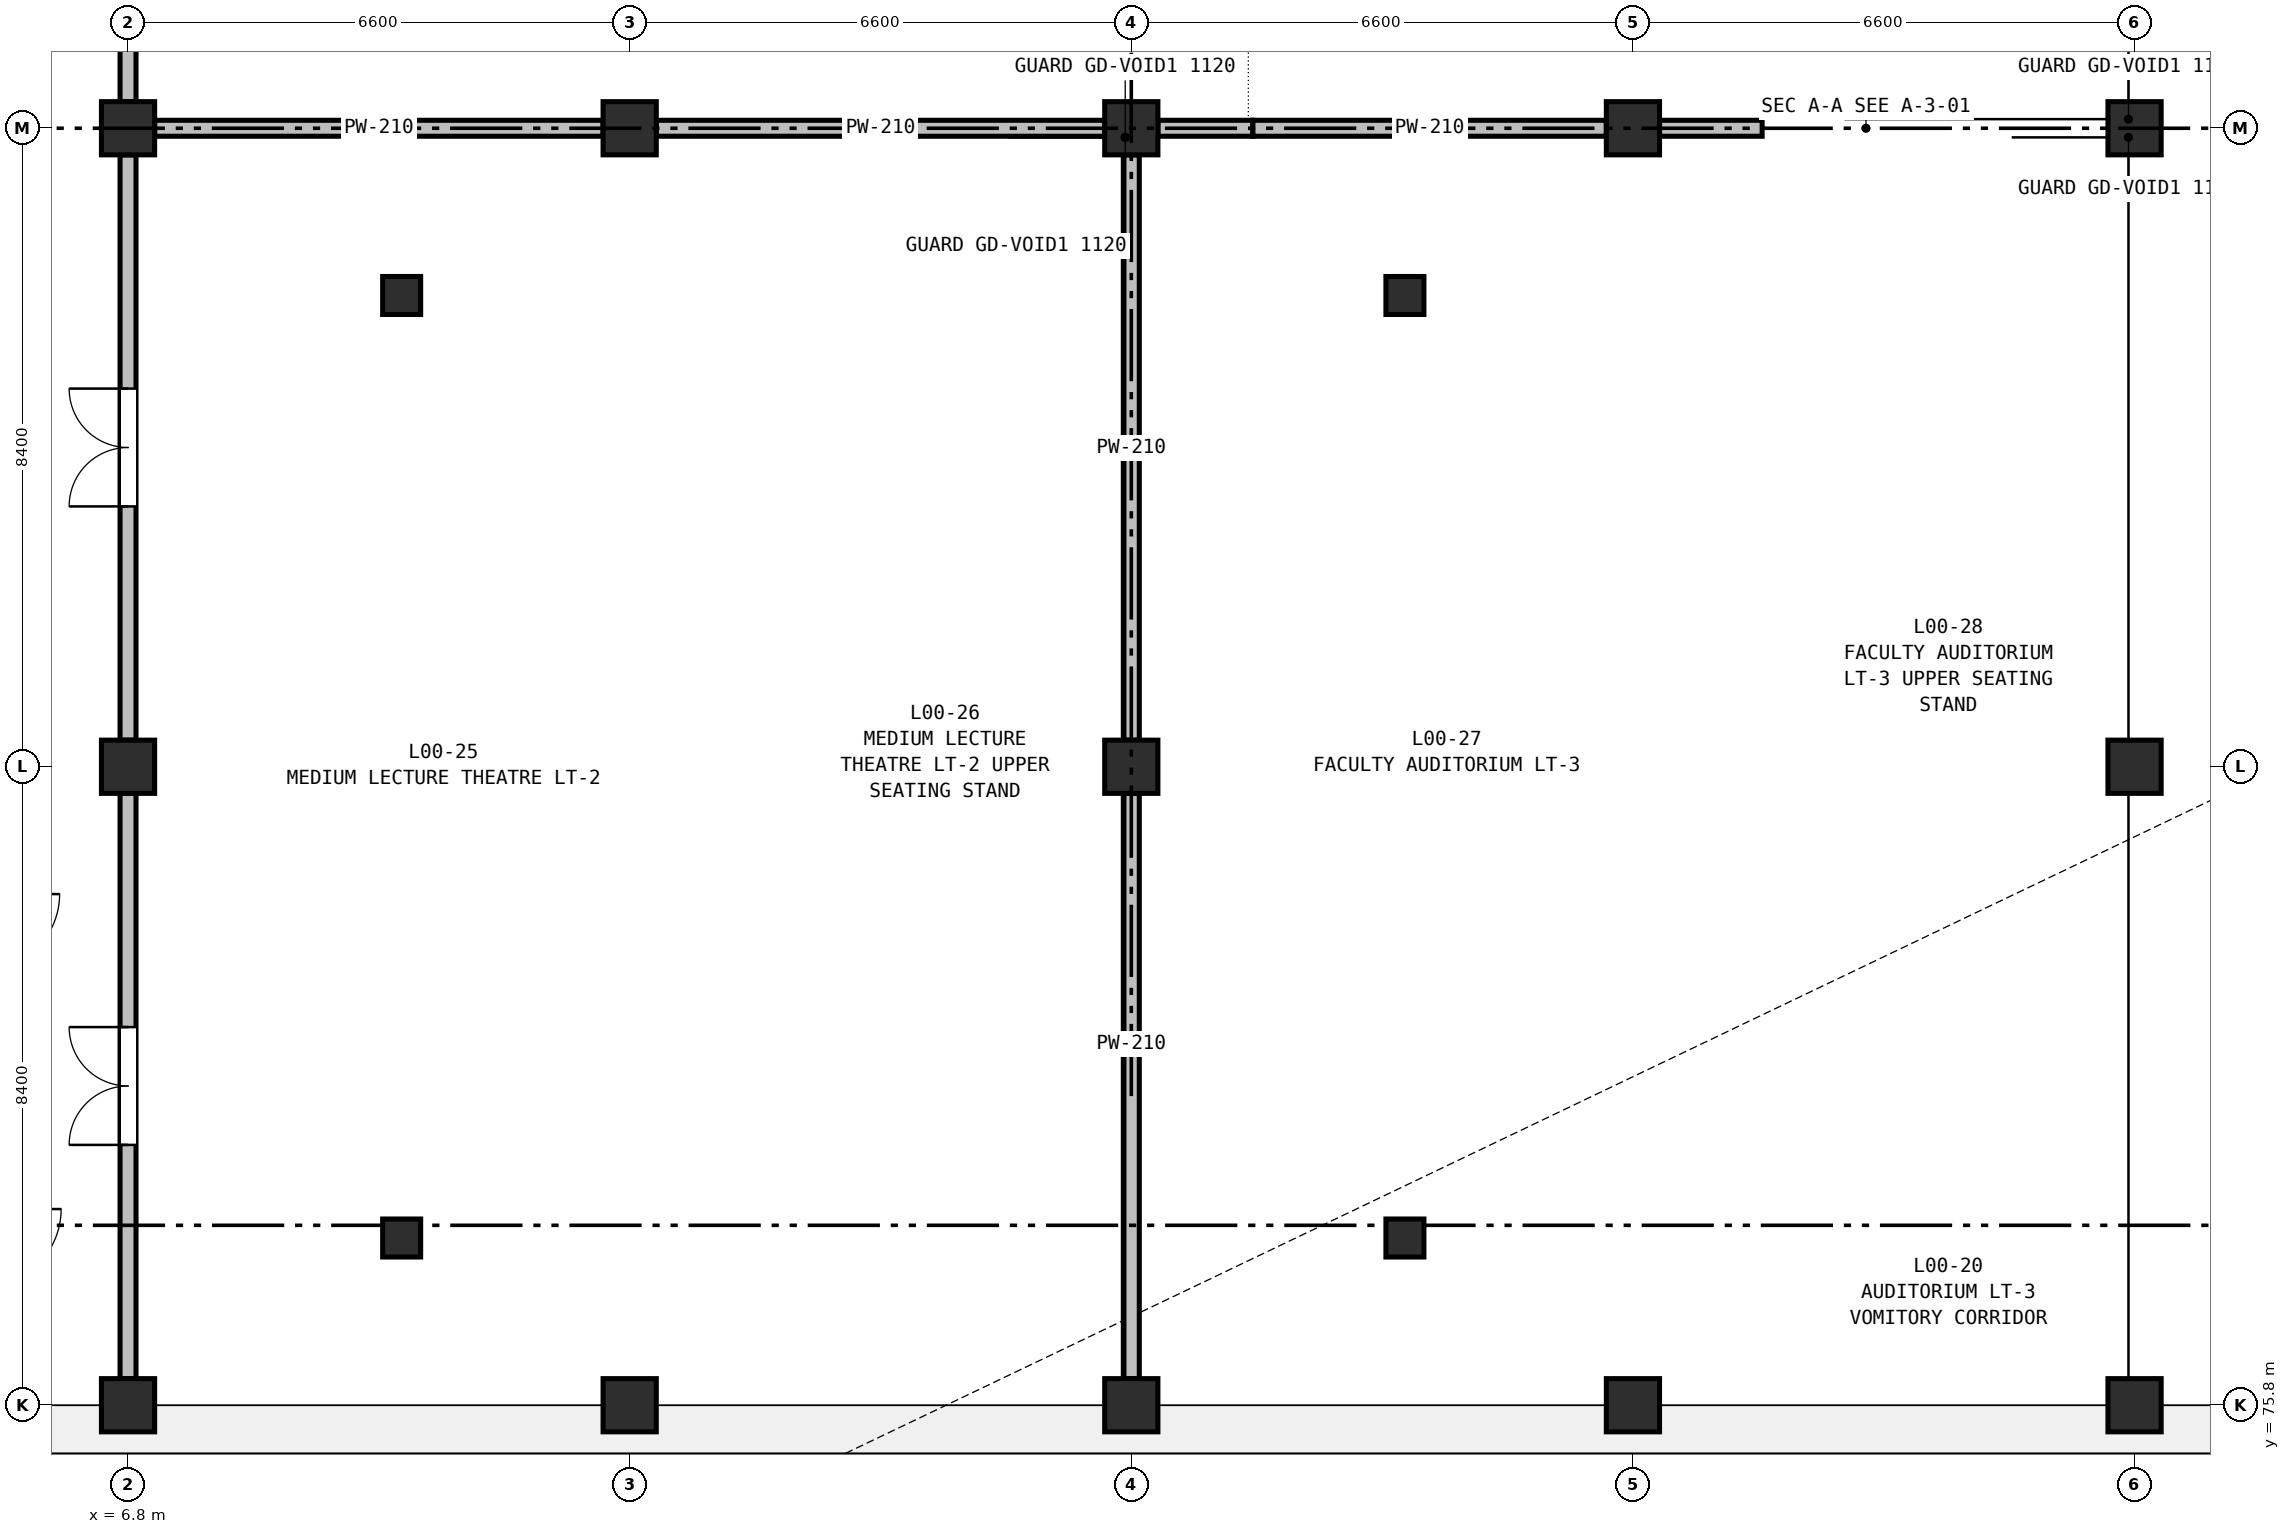
"""IFC4 building model, lengths in metres.
Left out: names, types, materials, properties, quantities, classifications, styles, units other than length and angle.
Written with IfcOpenShell. Run it as: python <this file> out.ifc"""

import sys

from ifc_helpers import new_model, si_unit, direction, frame, frame_2d, origin, origin_2d, place, context, subcontext, project, spatial, rectangle, extrude, element, fill, save


model = new_model("IFC4")
c1 = context("Model", 3, precision=1e-05, world=origin(), true_north=direction((0.0, 1.0)))
c2 = subcontext(c1, "Body", "Model", "MODEL_VIEW")
j1 = project(units=[si_unit("LENGTHUNIT", "METRE"), si_unit("PLANEANGLEUNIT", "RADIAN")], contexts=[c1])
p1 = place(None, origin())
s1 = spatial("IfcSite", under=j1, at=p1, CompositionType="ELEMENT")
p2 = place(p1, origin())
s2 = spatial("IfcBuilding", under=s1, at=p2, CompositionType="ELEMENT")
p3 = place(p2, origin())
s3 = spatial("IfcBuildingStorey", under=s2, at=p3, CompositionType="ELEMENT", Elevation=0.0)
for number, where, z_axis, x_axis in (
    (1, (6.8, 75.8, -0.32), (0.0, 0.0, 1.0), (1.0, 0.0, 0.0)),
    (2, (6.8, 84.2, -0.32), (0.0, 0.0, 1.0), (1.0, 0.0, 0.0)),
    (3, (6.8, 92.6, -0.32), (0.0, 0.0, 1.0), (1.0, 0.0, 0.0)),
    (4, (13.4, 75.8, -0.32), (0.0, 0.0, 1.0), (1.0, 0.0, 0.0)),
    (5, (13.4, 92.6, -0.32), (0.0, 0.0, 1.0), (1.0, 0.0, 0.0)),
    (6, (20.0, 75.8, -0.32), (0.0, 0.0, 1.0), (1.0, 0.0, 0.0)),
    (7, (20.0, 84.2, -0.32), (0.0, 0.0, 1.0), (1.0, 0.0, 0.0)),
    (8, (20.0, 92.6, -0.32), (0.0, 0.0, 1.0), (1.0, 0.0, 0.0)),
    (9, (26.6, 75.8, -0.32), (0.0, 0.0, 1.0), (1.0, 0.0, 0.0)),
    (10, (26.6, 92.6, -0.32), (0.0, 0.0, 1.0), (1.0, 0.0, 0.0)),
    (11, (33.2, 75.8, -0.32), (0.0, 0.0, 1.0), (1.0, 0.0, 0.0)),
    (12, (33.2, 84.2, -0.32), (0.0, 0.0, 1.0), (1.0, 0.0, 0.0)),
    (13, (33.2, 92.6, -0.32), (0.0, 0.0, 1.0), (1.0, 0.0, 0.0)),
):
    element("IfcColumn", number, at=place(p3, frame(where, z_axis=z_axis, x_axis=x_axis)), inside=s3, PredefinedType="COLUMN", context=c2, shape_type="SweptSolid", body=[
        extrude(rectangle(XDim=0.7, YDim=0.7, at=origin_2d()), origin(), (0.0, 0.0, 1.0), 5.72),
    ])
for number, where, z_axis, x_axis in (
    (14, (10.4, 78.0, -0.32), (0.0, 0.0, 1.0), (1.0, 0.0, 0.0)),
    (15, (10.4, 90.4, -0.32), (0.0, 0.0, 1.0), (1.0, 0.0, 0.0)),
    (16, (23.6, 78.0, -0.32), (0.0, 0.0, 1.0), (1.0, 0.0, 0.0)),
    (17, (23.6, 90.4, -0.32), (0.0, 0.0, 1.0), (1.0, 0.0, 0.0)),
):
    element("IfcColumn", number, at=place(p3, frame(where, z_axis=z_axis, x_axis=x_axis)), inside=s3, PredefinedType="COLUMN", context=c2, shape_type="SweptSolid", body=[
        extrude(rectangle(XDim=0.5, YDim=0.5, at=origin_2d()), origin(), (0.0, 0.0, 1.0), 0.77),
    ])
p4 = place(p3, frame((39.8, 75.97, 0.0), z_axis=(0.0, 0.0, 1.0), x_axis=(-1.0, 0.0, 0.0)))
e18 = element("IfcWall", 18, at=p4, inside=s3, PredefinedType="STANDARD", context=c2, shape_type="SweptSolid", body=[
    extrude(rectangle(XDim=6.6, YDim=0.34, at=frame_2d((3.3, 0.0))), origin(), (0.0, 0.0, 1.0), 4.535),
])
p5 = place(p4, frame((0.857, 0.0, 0.9)))
e19 = element("IfcOpeningElement", 19, at=p5, cuts=e18, PredefinedType="OPENING", context=c2, shape_type="SweptSolid", body=[
    extrude(rectangle(XDim=1.85, YDim=1.6, at=frame_2d((0.925, 0.8))), frame((0.0, 0.18, 0.0), z_axis=(0.0, -1.0, 0.0), x_axis=(1.0, 0.0, 0.0)), (0.0, 0.0, 1.0), 0.36),
])
p6 = place(p4, frame((3.893, 0.0, 0.9)))
e20 = element("IfcOpeningElement", 20, at=p6, cuts=e18, PredefinedType="OPENING", context=c2, shape_type="SweptSolid", body=[
    extrude(rectangle(XDim=1.85, YDim=1.6, at=frame_2d((0.925, 0.8))), frame((0.0, 0.18, 0.0), z_axis=(0.0, -1.0, 0.0), x_axis=(1.0, 0.0, 0.0)), (0.0, 0.0, 1.0), 0.36),
])
p7 = place(p3, frame((33.2, 75.97, 0.0), z_axis=(0.0, 0.0, 1.0), x_axis=(-1.0, 0.0, 0.0)))
e21 = element("IfcWall", 21, at=p7, inside=s3, PredefinedType="STANDARD", context=c2, shape_type="SweptSolid", body=[
    extrude(rectangle(XDim=6.6, YDim=0.34, at=frame_2d((3.3, 0.0))), origin(), (0.0, 0.0, 1.0), 4.535),
])
p8 = place(p7, frame((0.757, 0.0, 0.9)))
e22 = element("IfcOpeningElement", 22, at=p8, cuts=e21, PredefinedType="OPENING", context=c2, shape_type="SweptSolid", body=[
    extrude(rectangle(XDim=2.05, YDim=1.65, at=frame_2d((1.025, 0.825))), frame((0.0, 0.18, 0.0), z_axis=(0.0, -1.0, 0.0), x_axis=(1.0, 0.0, 0.0)), (0.0, 0.0, 1.0), 0.36),
])
p9 = place(p3, frame((26.6, 75.97, 0.0), z_axis=(0.0, 0.0, 1.0), x_axis=(-1.0, 0.0, 0.0)))
e23 = element("IfcWall", 23, at=p9, inside=s3, PredefinedType="STANDARD", context=c2, shape_type="SweptSolid", body=[
    extrude(rectangle(XDim=6.6, YDim=0.34, at=frame_2d((3.3, 0.0))), origin(), (0.0, 0.0, 1.0), 4.535),
])
p10 = place(p3, frame((20.0, 75.97, 0.0), z_axis=(0.0, 0.0, 1.0), x_axis=(-1.0, 0.0, 0.0)))
e24 = element("IfcWall", 24, at=p10, inside=s3, PredefinedType="STANDARD", context=c2, shape_type="SweptSolid", body=[
    extrude(rectangle(XDim=6.6, YDim=0.34, at=frame_2d((3.3, 0.0))), origin(), (0.0, 0.0, 1.0), 4.535),
])
p11 = place(p10, frame((1.132, 0.0, 0.75)))
e25 = element("IfcOpeningElement", 25, at=p11, cuts=e24, PredefinedType="OPENING", context=c2, shape_type="SweptSolid", body=[
    extrude(rectangle(XDim=1.3, YDim=2.4, at=frame_2d((0.65, 1.2))), frame((0.0, 0.18, 0.0), z_axis=(0.0, -1.0, 0.0), x_axis=(1.0, 0.0, 0.0)), (0.0, 0.0, 1.0), 0.36),
])
p12 = place(p10, frame((3.36, 0.0, 0.75)))
e26 = element("IfcOpeningElement", 26, at=p12, cuts=e24, PredefinedType="OPENING", context=c2, shape_type="SweptSolid", body=[
    extrude(rectangle(XDim=1.3, YDim=2.4, at=frame_2d((0.65, 1.2))), frame((0.0, 0.18, 0.0), z_axis=(0.0, -1.0, 0.0), x_axis=(1.0, 0.0, 0.0)), (0.0, 0.0, 1.0), 0.36),
])
p13 = place(p3, frame((13.4, 75.97, 0.0), z_axis=(0.0, 0.0, 1.0), x_axis=(-1.0, 0.0, 0.0)))
e27 = element("IfcWall", 27, at=p13, inside=s3, PredefinedType="STANDARD", context=c2, shape_type="SweptSolid", body=[
    extrude(rectangle(XDim=6.6, YDim=0.34, at=frame_2d((3.3, 0.0))), origin(), (0.0, 0.0, 1.0), 4.535),
])
p14 = place(p13, frame((1.007, 0.0, 0.75)))
e28 = element("IfcOpeningElement", 28, at=p14, cuts=e27, PredefinedType="OPENING", context=c2, shape_type="SweptSolid", body=[
    extrude(rectangle(XDim=1.55, YDim=2.4, at=frame_2d((0.775, 1.2))), frame((0.0, 0.18, 0.0), z_axis=(0.0, -1.0, 0.0), x_axis=(1.0, 0.0, 0.0)), (0.0, 0.0, 1.0), 0.36),
])
p15 = place(p13, frame((4.043, 0.0, 0.75)))
e29 = element("IfcOpeningElement", 29, at=p15, cuts=e27, PredefinedType="OPENING", context=c2, shape_type="SweptSolid", body=[
    extrude(rectangle(XDim=1.55, YDim=2.4, at=frame_2d((0.775, 1.2))), frame((0.0, 0.18, 0.0), z_axis=(0.0, -1.0, 0.0), x_axis=(1.0, 0.0, 0.0)), (0.0, 0.0, 1.0), 0.36),
])
p16 = place(p3, frame((6.8, 75.97, 0.0), z_axis=(0.0, 0.0, 1.0), x_axis=(-1.0, 0.0, 0.0)))
e30 = element("IfcWall", 30, at=p16, inside=s3, PredefinedType="STANDARD", context=c2, shape_type="SweptSolid", body=[
    extrude(rectangle(XDim=6.8, YDim=0.34, at=frame_2d((3.4, 0.0))), origin(), (0.0, 0.0, 1.0), 4.535),
])
p17 = place(p16, frame((2.14, 0.0, 0.75)))
e31 = element("IfcOpeningElement", 31, at=p17, cuts=e30, PredefinedType="OPENING", context=c2, shape_type="SweptSolid", body=[
    extrude(rectangle(XDim=1.8, YDim=2.4, at=frame_2d((0.9, 1.2))), frame((0.0, 0.18, 0.0), z_axis=(0.0, -1.0, 0.0), x_axis=(1.0, 0.0, 0.0)), (0.0, 0.0, 1.0), 0.36),
])
p18 = place(p3, frame((21.6, 92.6, 0.0), z_axis=(0.0, 0.0, 1.0), x_axis=(-1.0, 0.0, 0.0)))
e32 = element("IfcWall", 32, at=p18, inside=s3, PredefinedType="PARTITIONING", context=c2, shape_type="SweptSolid", body=[
    extrude(rectangle(XDim=1.25, YDim=0.21, at=frame_2d((0.625, 0.0))), origin(), (0.0, 0.0, 1.0), 4.735),
])
p19 = place(p3, frame((19.65, 92.6, 0.0), z_axis=(0.0, 0.0, 1.0), x_axis=(-1.0, 0.0, 0.0)))
e33 = element("IfcWall", 33, at=p19, inside=s3, PredefinedType="PARTITIONING", context=c2, shape_type="SweptSolid", body=[
    extrude(rectangle(XDim=5.9, YDim=0.21, at=frame_2d((2.95, 0.0))), origin(), (0.0, 0.0, 1.0), 4.735),
])
p20 = place(p3, frame((13.05, 92.6, 0.0), z_axis=(0.0, 0.0, 1.0), x_axis=(-1.0, 0.0, 0.0)))
e34 = element("IfcWall", 34, at=p20, inside=s3, PredefinedType="PARTITIONING", context=c2, shape_type="SweptSolid", body=[
    extrude(rectangle(XDim=5.9, YDim=0.21, at=frame_2d((2.95, 0.0))), origin(), (0.0, 0.0, 1.0), 4.735),
])
p21 = place(p3, frame((6.8, 92.95, 0.0), z_axis=(0.0, 0.0, 1.0), x_axis=(0.0, 1.0, 0.0)))
e35 = element("IfcWall", 35, at=p21, inside=s3, PredefinedType="PARTITIONING", context=c2, shape_type="SweptSolid", body=[
    extrude(rectangle(XDim=7.7, YDim=0.21, at=frame_2d((3.85, 0.0))), origin(), (0.0, 0.0, 1.0), 4.535),
])
p22 = place(p21, frame((3.075, 0.0, 0.0)))
e36 = element("IfcOpeningElement", 36, at=p22, cuts=e35, PredefinedType="OPENING", context=c2, shape_type="SweptSolid", body=[
    extrude(rectangle(XDim=1.55, YDim=2.2, at=frame_2d((0.775, 1.1))), frame((0.0, 0.115, 0.0), z_axis=(0.0, -1.0, 0.0), x_axis=(1.0, 0.0, 0.0)), (0.0, 0.0, 1.0), 0.23),
])
p23 = place(p3, frame((6.8, 76.15, 0.0), z_axis=(0.0, 0.0, 1.0), x_axis=(0.0, 1.0, 0.0)))
e37 = element("IfcWall", 37, at=p23, inside=s3, PredefinedType="PARTITIONING", context=c2, shape_type="SweptSolid", body=[
    extrude(rectangle(XDim=7.7, YDim=0.21, at=frame_2d((3.85, 0.0))), origin(), (0.0, 0.0, 1.0), 4.535),
])
p24 = place(p23, frame((3.075, 0.0, 0.0)))
e38 = element("IfcOpeningElement", 38, at=p24, cuts=e37, PredefinedType="OPENING", context=c2, shape_type="SweptSolid", body=[
    extrude(rectangle(XDim=1.55, YDim=2.2, at=frame_2d((0.775, 1.1))), frame((0.0, 0.115, 0.0), z_axis=(0.0, -1.0, 0.0), x_axis=(1.0, 0.0, 0.0)), (0.0, 0.0, 1.0), 0.23),
])
p25 = place(p3, frame((6.8, 84.55, 0.0), z_axis=(0.0, 0.0, 1.0), x_axis=(0.0, 1.0, 0.0)))
e39 = element("IfcWall", 39, at=p25, inside=s3, PredefinedType="PARTITIONING", context=c2, shape_type="SweptSolid", body=[
    extrude(rectangle(XDim=7.7, YDim=0.21, at=frame_2d((3.85, 0.0))), origin(), (0.0, 0.0, 1.0), 4.535),
])
p26 = place(p25, frame((3.075, 0.0, 0.0)))
e40 = element("IfcOpeningElement", 40, at=p26, cuts=e39, PredefinedType="OPENING", context=c2, shape_type="SweptSolid", body=[
    extrude(rectangle(XDim=1.55, YDim=2.2, at=frame_2d((0.775, 1.1))), frame((0.0, 0.115, 0.0), z_axis=(0.0, -1.0, 0.0), x_axis=(1.0, 0.0, 0.0)), (0.0, 0.0, 1.0), 0.23),
])
p27 = place(p3, frame((21.6, 92.6, 0.0), z_axis=(0.0, 0.0, 1.0), x_axis=(1.0, 0.0, 0.0)))
e41 = element("IfcWall", 41, at=p27, inside=s3, PredefinedType="PARTITIONING", context=c2, shape_type="SweptSolid", body=[
    extrude(rectangle(XDim=4.65, YDim=0.21, at=frame_2d((2.325, 0.0))), origin(), (0.0, 0.0, 1.0), 4.735),
])
p28 = place(p3, frame((26.95, 92.6, 0.0), z_axis=(0.0, 0.0, 1.0), x_axis=(1.0, 0.0, 0.0)))
e42 = element("IfcWall", 42, at=p28, inside=s3, PredefinedType="PARTITIONING", context=c2, shape_type="SweptSolid", body=[
    extrude(rectangle(XDim=1.35, YDim=0.21, at=frame_2d((0.675, 0.0))), origin(), (0.0, 0.0, 1.0), 4.735),
])
p29 = place(p3, frame((20.0, 76.15, 0.0), z_axis=(0.0, 0.0, 1.0), x_axis=(0.0, 1.0, 0.0)))
e43 = element("IfcWall", 43, at=p29, inside=s3, PredefinedType="PARTITIONING", context=c2, shape_type="SweptSolid", body=[
    extrude(rectangle(XDim=7.7, YDim=0.21, at=frame_2d((3.85, 0.0))), origin(), (0.0, 0.0, 1.0), 4.535),
])
p30 = place(p3, frame((20.0, 84.55, 0.0), z_axis=(0.0, 0.0, 1.0), x_axis=(0.0, 1.0, 0.0)))
e44 = element("IfcWall", 44, at=p30, inside=s3, PredefinedType="PARTITIONING", context=c2, shape_type="SweptSolid", body=[
    extrude(rectangle(XDim=7.7, YDim=0.21, at=frame_2d((3.85, 0.0))), origin(), (0.0, 0.0, 1.0), 4.535),
])
p31 = place(p6, origin())
e45 = element("IfcWindow", 45, at=p31, inside=s3, PartitioningType="SINGLE_PANEL", PredefinedType="WINDOW", context=c2, shape_type="SweptSolid", body=[
    extrude(rectangle(XDim=1.85, YDim=1.6, at=frame_2d((0.925, 0.8))), frame((0.0, 0.03, 0.0), z_axis=(0.0, -1.0, 0.0), x_axis=(1.0, 0.0, 0.0)), (0.0, 0.0, 1.0), 0.06),
])
fill(e20, e45)
p32 = place(p8, origin())
e46 = element("IfcWindow", 46, at=p32, inside=s3, PartitioningType="SINGLE_PANEL", PredefinedType="WINDOW", context=c2, shape_type="SweptSolid", body=[
    extrude(rectangle(XDim=2.05, YDim=1.65, at=frame_2d((1.025, 0.825))), frame((0.0, 0.03, 0.0), z_axis=(0.0, -1.0, 0.0), x_axis=(1.0, 0.0, 0.0)), (0.0, 0.0, 1.0), 0.06),
])
fill(e22, e46)
p33 = place(p11, origin())
e47 = element("IfcWindow", 47, at=p33, inside=s3, PartitioningType="SINGLE_PANEL", PredefinedType="WINDOW", context=c2, shape_type="SweptSolid", body=[
    extrude(rectangle(XDim=1.3, YDim=2.4, at=frame_2d((0.65, 1.2))), frame((0.0, 0.03, 0.0), z_axis=(0.0, -1.0, 0.0), x_axis=(1.0, 0.0, 0.0)), (0.0, 0.0, 1.0), 0.06),
])
fill(e25, e47)
p34 = place(p12, origin())
e48 = element("IfcWindow", 48, at=p34, inside=s3, PartitioningType="SINGLE_PANEL", PredefinedType="WINDOW", context=c2, shape_type="SweptSolid", body=[
    extrude(rectangle(XDim=1.3, YDim=2.4, at=frame_2d((0.65, 1.2))), frame((0.0, 0.03, 0.0), z_axis=(0.0, -1.0, 0.0), x_axis=(1.0, 0.0, 0.0)), (0.0, 0.0, 1.0), 0.06),
])
fill(e26, e48)
p35 = place(p14, origin())
e49 = element("IfcWindow", 49, at=p35, inside=s3, PartitioningType="SINGLE_PANEL", PredefinedType="WINDOW", context=c2, shape_type="SweptSolid", body=[
    extrude(rectangle(XDim=1.55, YDim=2.4, at=frame_2d((0.775, 1.2))), frame((0.0, 0.03, 0.0), z_axis=(0.0, -1.0, 0.0), x_axis=(1.0, 0.0, 0.0)), (0.0, 0.0, 1.0), 0.06),
])
fill(e28, e49)
p36 = place(p15, origin())
e50 = element("IfcWindow", 50, at=p36, inside=s3, PartitioningType="SINGLE_PANEL", PredefinedType="WINDOW", context=c2, shape_type="SweptSolid", body=[
    extrude(rectangle(XDim=1.55, YDim=2.4, at=frame_2d((0.775, 1.2))), frame((0.0, 0.03, 0.0), z_axis=(0.0, -1.0, 0.0), x_axis=(1.0, 0.0, 0.0)), (0.0, 0.0, 1.0), 0.06),
])
fill(e29, e50)
p37 = place(p26, origin())
e51 = element("IfcDoor", 51, at=p37, inside=s3, OperationType="DOUBLE_DOOR_SINGLE_SWING", PredefinedType="DOOR", context=c2, shape_type="SweptSolid", body=[
    extrude(rectangle(XDim=1.55, YDim=2.2, at=frame_2d((0.775, 1.1))), frame((0.0, 0.025, 0.0), z_axis=(0.0, -1.0, 0.0), x_axis=(1.0, 0.0, 0.0)), (0.0, 0.0, 1.0), 0.05),
])
fill(e40, e51)
p38 = place(p24, origin())
e52 = element("IfcDoor", 52, at=p38, inside=s3, OperationType="DOUBLE_DOOR_SINGLE_SWING", PredefinedType="DOOR", context=c2, shape_type="SweptSolid", body=[
    extrude(rectangle(XDim=1.55, YDim=2.2, at=frame_2d((0.775, 1.1))), frame((0.0, 0.025, 0.0), z_axis=(0.0, -1.0, 0.0), x_axis=(1.0, 0.0, 0.0)), (0.0, 0.0, 1.0), 0.05),
])
fill(e38, e52)
save(model, sys.argv[1])
